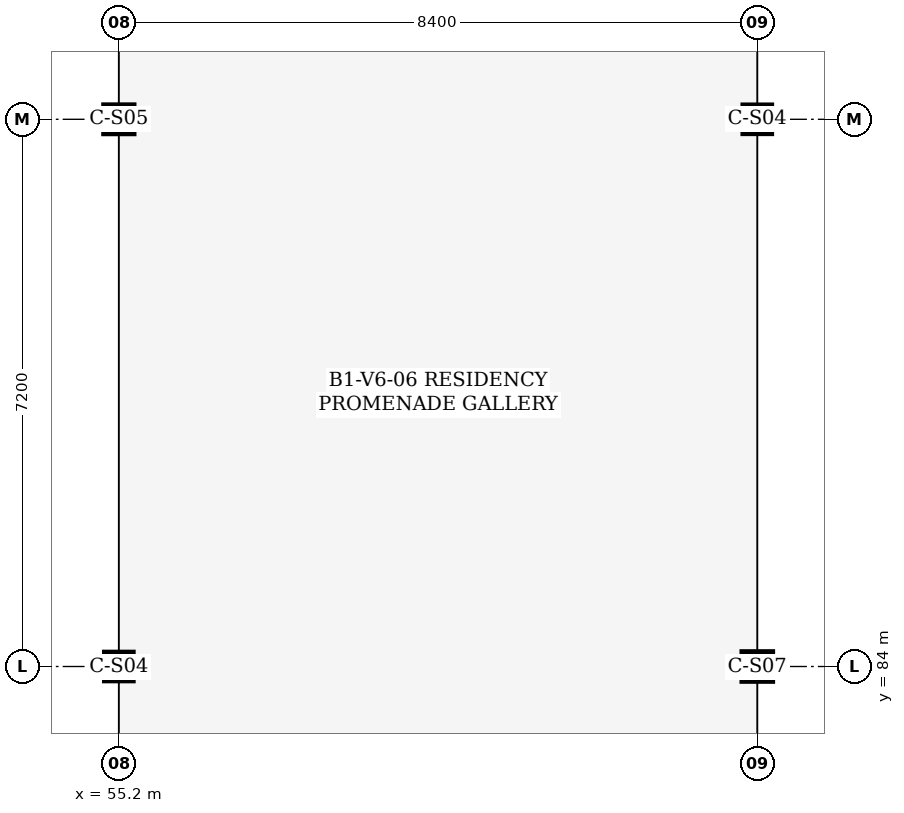
"""IFC4 building model, lengths in metres.
Left out: names, types, materials, properties, quantities, classifications, styles, units other than length and angle.
Written with IfcOpenShell. Run it as: python <this file> out.ifc"""

import sys

from ifc_helpers import new_model, si_unit, direction, frame, origin, origin_2d, place, context, subcontext, project, spatial, i_section, extrude, element, save


model = new_model("IFC4")
c1 = context("Model", 3, precision=1e-05, world=origin(), true_north=direction((0.0, 1.0)))
c2 = subcontext(c1, "Body", "Model", "MODEL_VIEW")
j1 = project(units=[si_unit("LENGTHUNIT", "METRE"), si_unit("PLANEANGLEUNIT", "RADIAN")], contexts=[c1])
p1 = place(None, origin())
s1 = spatial("IfcSite", under=j1, at=p1, CompositionType="ELEMENT")
p2 = place(p1, origin())
s2 = spatial("IfcBuilding", under=s1, at=p2, CompositionType="ELEMENT")
p3 = place(p2, frame((0.0, 0.0, -5.4)))
s3 = spatial("IfcBuildingStorey", under=s2, at=p3, CompositionType="ELEMENT", Elevation=-5.4)
p4 = place(p3, frame((55.2, 84.0, 0.0), z_axis=(0.0, 0.0, 1.0), x_axis=(1.0, 0.0, 0.0)))
e1 = element("IfcColumn", 1, at=p4, inside=s3, PredefinedType="COLUMN", context=c2, shape_type="SweptSolid", body=[
    extrude(i_section(OverallWidth=0.373, OverallDepth=0.373, WebThickness=0.016, FlangeThickness=0.026, FilletRadius=0.025, at=origin_2d()), origin(), (0.0, 0.0, 1.0), 5.4),
])
p5 = place(p3, frame((55.2, 91.2, 0.0), z_axis=(0.0, 0.0, 1.0), x_axis=(1.0, 0.0, 0.0)))
e2 = element("IfcColumn", 2, at=p5, inside=s3, PredefinedType="COLUMN", context=c2, shape_type="SweptSolid", body=[
    extrude(i_section(OverallWidth=0.394, OverallDepth=0.376, WebThickness=0.017, FlangeThickness=0.028, FilletRadius=0.025, at=origin_2d()), origin(), (0.0, 0.0, 1.0), 5.4),
])
p6 = place(p3, frame((63.6, 84.0, 0.0), z_axis=(0.0, 0.0, 1.0), x_axis=(1.0, 0.0, 0.0)))
e3 = element("IfcColumn", 3, at=p6, inside=s3, PredefinedType="COLUMN", context=c2, shape_type="SweptSolid", body=[
    extrude(i_section(OverallWidth=0.399, OverallDepth=0.386, WebThickness=0.021, FlangeThickness=0.033, FilletRadius=0.025, at=origin_2d()), origin(), (0.0, 0.0, 1.0), 5.4),
])
p7 = place(p3, frame((63.6, 91.2, 0.0), z_axis=(0.0, 0.0, 1.0), x_axis=(1.0, 0.0, 0.0)))
e4 = element("IfcColumn", 4, at=p7, inside=s3, PredefinedType="COLUMN", context=c2, shape_type="SweptSolid", body=[
    extrude(i_section(OverallWidth=0.373, OverallDepth=0.373, WebThickness=0.016, FlangeThickness=0.026, FilletRadius=0.025, at=origin_2d()), origin(), (0.0, 0.0, 1.0), 5.4),
])
save(model, sys.argv[1])
